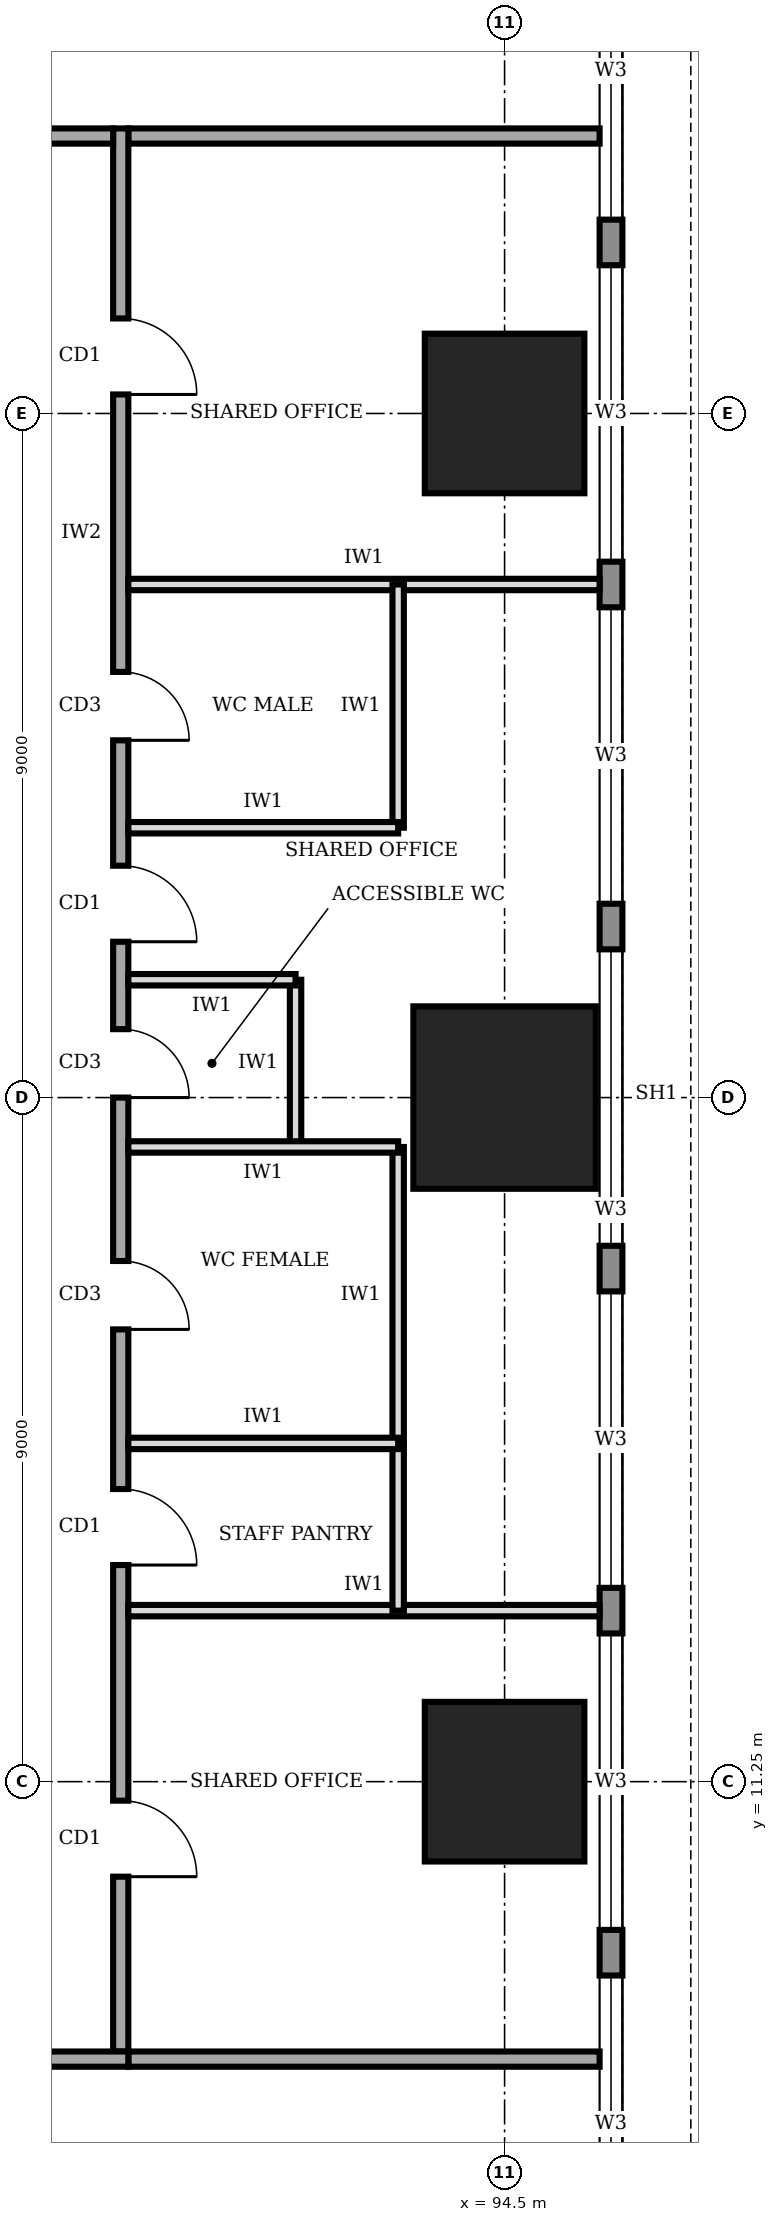
"""IFC4 building model, lengths in metres.
Left out: names, types, materials, properties, quantities, classifications, styles, units other than length and angle.
Written with IfcOpenShell. Run it as: python <this file> out.ifc"""

import sys

from ifc_helpers import new_model, si_unit, direction, frame, frame_2d, origin, origin_2d, place, context, subcontext, project, spatial, rectangle, extrude, element, fill, save


model = new_model("IFC4")
c1 = context("Model", 3, precision=1e-05, world=origin(), true_north=direction((0.0, 1.0)))
c2 = subcontext(c1, "Body", "Model", "MODEL_VIEW")
j1 = project(units=[si_unit("LENGTHUNIT", "METRE"), si_unit("PLANEANGLEUNIT", "RADIAN")], contexts=[c1])
p1 = place(None, origin())
s1 = spatial("IfcSite", under=j1, at=p1, CompositionType="ELEMENT")
p2 = place(p1, origin())
s2 = spatial("IfcBuilding", under=s1, at=p2, CompositionType="ELEMENT")
p3 = place(p2, frame((0.0, 0.0, 89.0)))
s3 = spatial("IfcBuildingStorey", under=s2, at=p3, CompositionType="ELEMENT", Elevation=89.0)
p4 = place(p3, frame((94.5, 11.25, 0.0), z_axis=(0.0, 0.0, 1.0), x_axis=(1.0, 0.0, 0.0)))
e1 = element("IfcColumn", 1, at=p4, inside=s3, PredefinedType="COLUMN", context=c2, shape_type="SweptSolid", body=[
    extrude(rectangle(XDim=2.1, YDim=2.1, at=origin_2d()), origin(), (0.0, 0.0, 1.0), 4.0),
])
p5 = place(p3, frame((94.5, 20.25, 0.0), z_axis=(0.0, 0.0, 1.0), x_axis=(1.0, 0.0, 0.0)))
e2 = element("IfcColumn", 2, at=p5, inside=s3, PredefinedType="COLUMN", context=c2, shape_type="SweptSolid", body=[
    extrude(rectangle(XDim=2.4, YDim=2.4, at=origin_2d()), origin(), (0.0, 0.0, 1.0), 4.0),
])
p6 = place(p3, frame((94.5, 29.25, 0.0), z_axis=(0.0, 0.0, 1.0), x_axis=(1.0, 0.0, 0.0)))
e3 = element("IfcColumn", 3, at=p6, inside=s3, PredefinedType="COLUMN", context=c2, shape_type="SweptSolid", body=[
    extrude(rectangle(XDim=2.1, YDim=2.1, at=origin_2d()), origin(), (0.0, 0.0, 1.0), 4.0),
])
p7 = place(p3, frame((95.9, 3.32, 0.0), z_axis=(0.0, 0.0, 1.0), x_axis=(0.0, 1.0, 0.0)))
e4 = element("IfcWall", 4, at=p7, inside=s3, PredefinedType="STANDARD", context=c2, shape_type="SweptSolid", body=[
    extrude(rectangle(XDim=33.96, YDim=0.3, at=frame_2d((16.98, 0.0))), origin(), (0.0, 0.0, 1.0), 3.75),
])
p8 = place(p7, frame((1.48, 0.0, 0.95)))
e5 = element("IfcOpeningElement", 5, at=p8, cuts=e4, PredefinedType="OPENING", context=c2, shape_type="SweptSolid", body=[
    extrude(rectangle(XDim=3.9, YDim=1.8, at=frame_2d((1.95, 0.9))), frame((0.0, 0.16, 0.0), z_axis=(0.0, -1.0, 0.0), x_axis=(1.0, 0.0, 0.0)), (0.0, 0.0, 1.0), 0.32),
])
p9 = place(p7, frame((5.98, 0.0, 0.95)))
e6 = element("IfcOpeningElement", 6, at=p9, cuts=e4, PredefinedType="OPENING", context=c2, shape_type="SweptSolid", body=[
    extrude(rectangle(XDim=3.9, YDim=1.8, at=frame_2d((1.95, 0.9))), frame((0.0, 0.16, 0.0), z_axis=(0.0, -1.0, 0.0), x_axis=(1.0, 0.0, 0.0)), (0.0, 0.0, 1.0), 0.32),
])
p10 = place(p7, frame((10.48, 0.0, 0.95)))
e7 = element("IfcOpeningElement", 7, at=p10, cuts=e4, PredefinedType="OPENING", context=c2, shape_type="SweptSolid", body=[
    extrude(rectangle(XDim=3.9, YDim=1.8, at=frame_2d((1.95, 0.9))), frame((0.0, 0.16, 0.0), z_axis=(0.0, -1.0, 0.0), x_axis=(1.0, 0.0, 0.0)), (0.0, 0.0, 1.0), 0.32),
])
p11 = place(p7, frame((14.98, 0.0, 0.95)))
e8 = element("IfcOpeningElement", 8, at=p11, cuts=e4, PredefinedType="OPENING", context=c2, shape_type="SweptSolid", body=[
    extrude(rectangle(XDim=3.9, YDim=1.8, at=frame_2d((1.95, 0.9))), frame((0.0, 0.16, 0.0), z_axis=(0.0, -1.0, 0.0), x_axis=(1.0, 0.0, 0.0)), (0.0, 0.0, 1.0), 0.32),
])
p12 = place(p7, frame((19.48, 0.0, 0.95)))
e9 = element("IfcOpeningElement", 9, at=p12, cuts=e4, PredefinedType="OPENING", context=c2, shape_type="SweptSolid", body=[
    extrude(rectangle(XDim=3.9, YDim=1.8, at=frame_2d((1.95, 0.9))), frame((0.0, 0.16, 0.0), z_axis=(0.0, -1.0, 0.0), x_axis=(1.0, 0.0, 0.0)), (0.0, 0.0, 1.0), 0.32),
])
p13 = place(p7, frame((23.98, 0.0, 0.95)))
e10 = element("IfcOpeningElement", 10, at=p13, cuts=e4, PredefinedType="OPENING", context=c2, shape_type="SweptSolid", body=[
    extrude(rectangle(XDim=3.9, YDim=1.8, at=frame_2d((1.95, 0.9))), frame((0.0, 0.16, 0.0), z_axis=(0.0, -1.0, 0.0), x_axis=(1.0, 0.0, 0.0)), (0.0, 0.0, 1.0), 0.32),
])
p14 = place(p7, frame((28.48, 0.0, 0.95)))
e11 = element("IfcOpeningElement", 11, at=p14, cuts=e4, PredefinedType="OPENING", context=c2, shape_type="SweptSolid", body=[
    extrude(rectangle(XDim=3.9, YDim=1.8, at=frame_2d((1.95, 0.9))), frame((0.0, 0.16, 0.0), z_axis=(0.0, -1.0, 0.0), x_axis=(1.0, 0.0, 0.0)), (0.0, 0.0, 1.0), 0.32),
])
p15 = place(p3, frame((63.3, 7.6, 0.0), z_axis=(0.0, 0.0, 1.0), x_axis=(1.0, 0.0, 0.0)))
e12 = element("IfcWall", 12, at=p15, inside=s3, PredefinedType="SOLIDWALL", context=c2, shape_type="SweptSolid", body=[
    extrude(rectangle(XDim=26.25, YDim=0.2, at=frame_2d((13.125, 0.0))), origin(), (0.0, 0.0, 1.0), 3.75),
])
p16 = place(p15, frame((6.0, 0.0, 0.0)))
e13 = element("IfcOpeningElement", 13, at=p16, cuts=e12, PredefinedType="OPENING", context=c2, shape_type="SweptSolid", body=[
    extrude(rectangle(XDim=1.0, YDim=2.1, at=frame_2d((0.5, 1.05))), frame((0.0, 0.11, 0.0), z_axis=(0.0, -1.0, 0.0), x_axis=(1.0, 0.0, 0.0)), (0.0, 0.0, 1.0), 0.22),
])
p17 = place(p15, frame((19.325, 0.0, 0.0)))
e14 = element("IfcOpeningElement", 14, at=p17, cuts=e12, PredefinedType="OPENING", context=c2, shape_type="SweptSolid", body=[
    extrude(rectangle(XDim=1.0, YDim=2.1, at=frame_2d((0.5, 1.05))), frame((0.0, 0.11, 0.0), z_axis=(0.0, -1.0, 0.0), x_axis=(1.0, 0.0, 0.0)), (0.0, 0.0, 1.0), 0.22),
])
p18 = place(p3, frame((89.45, 7.7, 0.0), z_axis=(0.0, 0.0, 1.0), x_axis=(0.0, 1.0, 0.0)))
e15 = element("IfcWall", 15, at=p18, inside=s3, PredefinedType="SOLIDWALL", context=c2, shape_type="SweptSolid", body=[
    extrude(rectangle(XDim=25.3, YDim=0.2, at=frame_2d((12.65, 0.0))), origin(), (0.0, 0.0, 1.0), 3.75),
])
p19 = place(p18, frame((2.3, 0.0, 0.0)))
e16 = element("IfcOpeningElement", 16, at=p19, cuts=e15, PredefinedType="OPENING", context=c2, shape_type="SweptSolid", body=[
    extrude(rectangle(XDim=1.0, YDim=2.1, at=frame_2d((0.5, 1.05))), frame((0.0, 0.11, 0.0), z_axis=(0.0, -1.0, 0.0), x_axis=(1.0, 0.0, 0.0)), (0.0, 0.0, 1.0), 0.22),
])
p20 = place(p18, frame((6.4, 0.0, 0.0)))
e17 = element("IfcOpeningElement", 17, at=p20, cuts=e15, PredefinedType="OPENING", context=c2, shape_type="SweptSolid", body=[
    extrude(rectangle(XDim=1.0, YDim=2.1, at=frame_2d((0.5, 1.05))), frame((0.0, 0.11, 0.0), z_axis=(0.0, -1.0, 0.0), x_axis=(1.0, 0.0, 0.0)), (0.0, 0.0, 1.0), 0.22),
])
p21 = place(p18, frame((9.5, 0.0, 0.0)))
e18 = element("IfcOpeningElement", 18, at=p21, cuts=e15, PredefinedType="OPENING", context=c2, shape_type="SweptSolid", body=[
    extrude(rectangle(XDim=0.9, YDim=2.1, at=frame_2d((0.45, 1.05))), frame((0.0, 0.11, 0.0), z_axis=(0.0, -1.0, 0.0), x_axis=(1.0, 0.0, 0.0)), (0.0, 0.0, 1.0), 0.22),
])
p22 = place(p18, frame((12.55, 0.0, 0.0)))
e19 = element("IfcOpeningElement", 19, at=p22, cuts=e15, PredefinedType="OPENING", context=c2, shape_type="SweptSolid", body=[
    extrude(rectangle(XDim=0.9, YDim=2.1, at=frame_2d((0.45, 1.05))), frame((0.0, 0.11, 0.0), z_axis=(0.0, -1.0, 0.0), x_axis=(1.0, 0.0, 0.0)), (0.0, 0.0, 1.0), 0.22),
])
p23 = place(p18, frame((17.25, 0.0, 0.0)))
e20 = element("IfcOpeningElement", 20, at=p23, cuts=e15, PredefinedType="OPENING", context=c2, shape_type="SweptSolid", body=[
    extrude(rectangle(XDim=0.9, YDim=2.1, at=frame_2d((0.45, 1.05))), frame((0.0, 0.11, 0.0), z_axis=(0.0, -1.0, 0.0), x_axis=(1.0, 0.0, 0.0)), (0.0, 0.0, 1.0), 0.22),
])
p24 = place(p18, frame((14.6, 0.0, 0.0)))
e21 = element("IfcOpeningElement", 21, at=p24, cuts=e15, PredefinedType="OPENING", context=c2, shape_type="SweptSolid", body=[
    extrude(rectangle(XDim=1.0, YDim=2.1, at=frame_2d((0.5, 1.05))), frame((0.0, 0.11, 0.0), z_axis=(0.0, -1.0, 0.0), x_axis=(1.0, 0.0, 0.0)), (0.0, 0.0, 1.0), 0.22),
])
p25 = place(p18, frame((21.8, 0.0, 0.0)))
e22 = element("IfcOpeningElement", 22, at=p25, cuts=e15, PredefinedType="OPENING", context=c2, shape_type="SweptSolid", body=[
    extrude(rectangle(XDim=1.0, YDim=2.1, at=frame_2d((0.5, 1.05))), frame((0.0, 0.11, 0.0), z_axis=(0.0, -1.0, 0.0), x_axis=(1.0, 0.0, 0.0)), (0.0, 0.0, 1.0), 0.22),
])
p26 = place(p3, frame((89.35, 32.9, 0.0), z_axis=(0.0, 0.0, 1.0), x_axis=(-1.0, 0.0, 0.0)))
e23 = element("IfcWall", 23, at=p26, inside=s3, PredefinedType="SOLIDWALL", context=c2, shape_type="SweptSolid", body=[
    extrude(rectangle(XDim=26.05, YDim=0.2, at=frame_2d((13.025, 0.0))), origin(), (0.0, 0.0, 1.0), 3.75),
])
p27 = place(p26, frame((19.05, 0.0, 0.0)))
e24 = element("IfcOpeningElement", 24, at=p27, cuts=e23, PredefinedType="OPENING", context=c2, shape_type="SweptSolid", body=[
    extrude(rectangle(XDim=1.0, YDim=2.1, at=frame_2d((0.5, 1.05))), frame((0.0, 0.11, 0.0), z_axis=(0.0, -1.0, 0.0), x_axis=(1.0, 0.0, 0.0)), (0.0, 0.0, 1.0), 0.22),
])
p28 = place(p26, frame((7.85, 0.0, 0.0)))
e25 = element("IfcOpeningElement", 25, at=p28, cuts=e23, PredefinedType="OPENING", context=c2, shape_type="SweptSolid", body=[
    extrude(rectangle(XDim=1.0, YDim=2.1, at=frame_2d((0.5, 1.05))), frame((0.0, 0.11, 0.0), z_axis=(0.0, -1.0, 0.0), x_axis=(1.0, 0.0, 0.0)), (0.0, 0.0, 1.0), 0.22),
])
p29 = place(p26, frame((1.325, 0.0, 0.0)))
e26 = element("IfcOpeningElement", 26, at=p29, cuts=e23, PredefinedType="OPENING", context=c2, shape_type="SweptSolid", body=[
    extrude(rectangle(XDim=1.0, YDim=2.1, at=frame_2d((0.5, 1.05))), frame((0.0, 0.11, 0.0), z_axis=(0.0, -1.0, 0.0), x_axis=(1.0, 0.0, 0.0)), (0.0, 0.0, 1.0), 0.22),
])
for number, where, z_axis, x_axis in (
    (27, (89.55, 7.6, 0.0), (0.0, 0.0, 1.0), (1.0, 0.0, 0.0)),
    (28, (89.55, 32.9, 0.0), (0.0, 0.0, 1.0), (1.0, 0.0, 0.0)),
):
    element("IfcWall", number, at=place(p3, frame(where, z_axis=z_axis, x_axis=x_axis)), inside=s3, PredefinedType="SOLIDWALL", context=c2, shape_type="SweptSolid", body=[
        extrude(rectangle(XDim=6.2, YDim=0.2, at=frame_2d((3.1, 0.0))), origin(), (0.0, 0.0, 1.0), 3.75),
    ])
for number, where, z_axis, x_axis in (
    (29, (89.55, 13.5, 0.0), (0.0, 0.0, 1.0), (1.0, 0.0, 0.0)),
    (30, (89.55, 27.0, 0.0), (0.0, 0.0, 1.0), (1.0, 0.0, 0.0)),
):
    element("IfcWall", number, at=place(p3, frame(where, z_axis=z_axis, x_axis=x_axis)), inside=s3, PredefinedType="PARTITIONING", context=c2, shape_type="SweptSolid", body=[
        extrude(rectangle(XDim=6.2, YDim=0.15, at=frame_2d((3.1, 0.0))), origin(), (0.0, 0.0, 1.0), 3.75),
    ])
p30 = place(p3, frame((89.55, 15.7, 0.0), z_axis=(0.0, 0.0, 1.0), x_axis=(1.0, 0.0, 0.0)))
e31 = element("IfcWall", 31, at=p30, inside=s3, PredefinedType="PARTITIONING", context=c2, shape_type="SweptSolid", body=[
    extrude(rectangle(XDim=3.55, YDim=0.15, at=frame_2d((1.775, 0.0))), origin(), (0.0, 0.0, 1.0), 3.75),
])
p31 = place(p3, frame((89.55, 19.6, 0.0), z_axis=(0.0, 0.0, 1.0), x_axis=(1.0, 0.0, 0.0)))
e32 = element("IfcWall", 32, at=p31, inside=s3, PredefinedType="PARTITIONING", context=c2, shape_type="SweptSolid", body=[
    extrude(rectangle(XDim=3.55, YDim=0.15, at=frame_2d((1.775, 0.0))), origin(), (0.0, 0.0, 1.0), 2.85),
])
p32 = place(p3, frame((89.55, 21.8, 0.0), z_axis=(0.0, 0.0, 1.0), x_axis=(1.0, 0.0, 0.0)))
e33 = element("IfcWall", 33, at=p32, inside=s3, PredefinedType="PARTITIONING", context=c2, shape_type="SweptSolid", body=[
    extrude(rectangle(XDim=2.2, YDim=0.15, at=frame_2d((1.1, 0.0))), origin(), (0.0, 0.0, 1.0), 3.75),
])
p33 = place(p3, frame((89.55, 23.8, 0.0), z_axis=(0.0, 0.0, 1.0), x_axis=(1.0, 0.0, 0.0)))
e34 = element("IfcWall", 34, at=p33, inside=s3, PredefinedType="PARTITIONING", context=c2, shape_type="SweptSolid", body=[
    extrude(rectangle(XDim=3.55, YDim=0.15, at=frame_2d((1.775, 0.0))), origin(), (0.0, 0.0, 1.0), 3.75),
])
p34 = place(p3, frame((93.1, 13.5, 0.0), z_axis=(0.0, 0.0, 1.0), x_axis=(0.0, 1.0, 0.0)))
e35 = element("IfcWall", 35, at=p34, inside=s3, PredefinedType="PARTITIONING", context=c2, shape_type="SweptSolid", body=[
    extrude(rectangle(XDim=2.2, YDim=0.15, at=frame_2d((1.1, 0.0))), origin(), (0.0, 0.0, 1.0), 3.75),
])
p35 = place(p3, frame((93.1, 15.7, 0.0), z_axis=(0.0, 0.0, 1.0), x_axis=(0.0, 1.0, 0.0)))
e36 = element("IfcWall", 36, at=p35, inside=s3, PredefinedType="PARTITIONING", context=c2, shape_type="SweptSolid", body=[
    extrude(rectangle(XDim=3.9, YDim=0.15, at=frame_2d((1.95, 0.0))), origin(), (0.0, 0.0, 1.0), 3.75),
])
p36 = place(p3, frame((91.75, 19.6, 0.0), z_axis=(0.0, 0.0, 1.0), x_axis=(0.0, 1.0, 0.0)))
e37 = element("IfcWall", 37, at=p36, inside=s3, PredefinedType="PARTITIONING", context=c2, shape_type="SweptSolid", body=[
    extrude(rectangle(XDim=2.2, YDim=0.15, at=frame_2d((1.1, 0.0))), origin(), (0.0, 0.0, 1.0), 3.75),
])
p37 = place(p3, frame((93.1, 23.8, 0.0), z_axis=(0.0, 0.0, 1.0), x_axis=(0.0, 1.0, 0.0)))
e38 = element("IfcWall", 38, at=p37, inside=s3, PredefinedType="PARTITIONING", context=c2, shape_type="SweptSolid", body=[
    extrude(rectangle(XDim=3.2, YDim=0.15, at=frame_2d((1.6, 0.0))), origin(), (0.0, 0.0, 1.0), 3.75),
])
p38 = place(p8, origin())
e39 = element("IfcWindow", 39, at=p38, inside=s3, PartitioningType="SINGLE_PANEL", PredefinedType="WINDOW", context=c2, shape_type="SweptSolid", body=[
    extrude(rectangle(XDim=3.9, YDim=1.8, at=frame_2d((1.95, 0.9))), frame((0.0, 0.03, 0.0), z_axis=(0.0, -1.0, 0.0), x_axis=(1.0, 0.0, 0.0)), (0.0, 0.0, 1.0), 0.06),
])
fill(e5, e39)
p39 = place(p9, origin())
e40 = element("IfcWindow", 40, at=p39, inside=s3, PartitioningType="SINGLE_PANEL", PredefinedType="WINDOW", context=c2, shape_type="SweptSolid", body=[
    extrude(rectangle(XDim=3.9, YDim=1.8, at=frame_2d((1.95, 0.9))), frame((0.0, 0.03, 0.0), z_axis=(0.0, -1.0, 0.0), x_axis=(1.0, 0.0, 0.0)), (0.0, 0.0, 1.0), 0.06),
])
fill(e6, e40)
p40 = place(p10, origin())
e41 = element("IfcWindow", 41, at=p40, inside=s3, PartitioningType="SINGLE_PANEL", PredefinedType="WINDOW", context=c2, shape_type="SweptSolid", body=[
    extrude(rectangle(XDim=3.9, YDim=1.8, at=frame_2d((1.95, 0.9))), frame((0.0, 0.03, 0.0), z_axis=(0.0, -1.0, 0.0), x_axis=(1.0, 0.0, 0.0)), (0.0, 0.0, 1.0), 0.06),
])
fill(e7, e41)
p41 = place(p11, origin())
e42 = element("IfcWindow", 42, at=p41, inside=s3, PartitioningType="SINGLE_PANEL", PredefinedType="WINDOW", context=c2, shape_type="SweptSolid", body=[
    extrude(rectangle(XDim=3.9, YDim=1.8, at=frame_2d((1.95, 0.9))), frame((0.0, 0.03, 0.0), z_axis=(0.0, -1.0, 0.0), x_axis=(1.0, 0.0, 0.0)), (0.0, 0.0, 1.0), 0.06),
])
fill(e8, e42)
p42 = place(p12, origin())
e43 = element("IfcWindow", 43, at=p42, inside=s3, PartitioningType="SINGLE_PANEL", PredefinedType="WINDOW", context=c2, shape_type="SweptSolid", body=[
    extrude(rectangle(XDim=3.9, YDim=1.8, at=frame_2d((1.95, 0.9))), frame((0.0, 0.03, 0.0), z_axis=(0.0, -1.0, 0.0), x_axis=(1.0, 0.0, 0.0)), (0.0, 0.0, 1.0), 0.06),
])
fill(e9, e43)
p43 = place(p13, origin())
e44 = element("IfcWindow", 44, at=p43, inside=s3, PartitioningType="SINGLE_PANEL", PredefinedType="WINDOW", context=c2, shape_type="SweptSolid", body=[
    extrude(rectangle(XDim=3.9, YDim=1.8, at=frame_2d((1.95, 0.9))), frame((0.0, 0.03, 0.0), z_axis=(0.0, -1.0, 0.0), x_axis=(1.0, 0.0, 0.0)), (0.0, 0.0, 1.0), 0.06),
])
fill(e10, e44)
p44 = place(p14, origin())
e45 = element("IfcWindow", 45, at=p44, inside=s3, PartitioningType="SINGLE_PANEL", PredefinedType="WINDOW", context=c2, shape_type="SweptSolid", body=[
    extrude(rectangle(XDim=3.9, YDim=1.8, at=frame_2d((1.95, 0.9))), frame((0.0, 0.03, 0.0), z_axis=(0.0, -1.0, 0.0), x_axis=(1.0, 0.0, 0.0)), (0.0, 0.0, 1.0), 0.06),
])
fill(e11, e45)
p45 = place(p19, frame((1.0, 0.0, 0.0), z_axis=(0.0, 0.0, 1.0), x_axis=(-1.0, 0.0, 0.0)))
e46 = element("IfcDoor", 46, at=p45, inside=s3, OperationType="SINGLE_SWING_RIGHT", PredefinedType="DOOR", context=c2, shape_type="SweptSolid", body=[
    extrude(rectangle(XDim=1.0, YDim=2.1, at=frame_2d((0.5, 1.05))), frame((0.0, 0.025, 0.0), z_axis=(0.0, -1.0, 0.0), x_axis=(1.0, 0.0, 0.0)), (0.0, 0.0, 1.0), 0.05),
])
fill(e16, e46)
p46 = place(p20, frame((1.0, 0.0, 0.0), z_axis=(0.0, 0.0, 1.0), x_axis=(-1.0, 0.0, 0.0)))
e47 = element("IfcDoor", 47, at=p46, inside=s3, OperationType="SINGLE_SWING_RIGHT", PredefinedType="DOOR", context=c2, shape_type="SweptSolid", body=[
    extrude(rectangle(XDim=1.0, YDim=2.1, at=frame_2d((0.5, 1.05))), frame((0.0, 0.025, 0.0), z_axis=(0.0, -1.0, 0.0), x_axis=(1.0, 0.0, 0.0)), (0.0, 0.0, 1.0), 0.05),
])
fill(e17, e47)
p47 = place(p21, frame((0.9, 0.0, 0.0), z_axis=(0.0, 0.0, 1.0), x_axis=(-1.0, 0.0, 0.0)))
e48 = element("IfcDoor", 48, at=p47, inside=s3, OperationType="SINGLE_SWING_RIGHT", PredefinedType="DOOR", context=c2, shape_type="SweptSolid", body=[
    extrude(rectangle(XDim=0.9, YDim=2.1, at=frame_2d((0.45, 1.05))), frame((0.0, 0.025, 0.0), z_axis=(0.0, -1.0, 0.0), x_axis=(1.0, 0.0, 0.0)), (0.0, 0.0, 1.0), 0.05),
])
fill(e18, e48)
p48 = place(p22, frame((0.9, 0.0, 0.0), z_axis=(0.0, 0.0, 1.0), x_axis=(-1.0, 0.0, 0.0)))
e49 = element("IfcDoor", 49, at=p48, inside=s3, OperationType="SINGLE_SWING_RIGHT", PredefinedType="DOOR", context=c2, shape_type="SweptSolid", body=[
    extrude(rectangle(XDim=0.9, YDim=2.1, at=frame_2d((0.45, 1.05))), frame((0.0, 0.025, 0.0), z_axis=(0.0, -1.0, 0.0), x_axis=(1.0, 0.0, 0.0)), (0.0, 0.0, 1.0), 0.05),
])
fill(e19, e49)
p49 = place(p23, frame((0.9, 0.0, 0.0), z_axis=(0.0, 0.0, 1.0), x_axis=(-1.0, 0.0, 0.0)))
e50 = element("IfcDoor", 50, at=p49, inside=s3, OperationType="SINGLE_SWING_RIGHT", PredefinedType="DOOR", context=c2, shape_type="SweptSolid", body=[
    extrude(rectangle(XDim=0.9, YDim=2.1, at=frame_2d((0.45, 1.05))), frame((0.0, 0.025, 0.0), z_axis=(0.0, -1.0, 0.0), x_axis=(1.0, 0.0, 0.0)), (0.0, 0.0, 1.0), 0.05),
])
fill(e20, e50)
p50 = place(p24, frame((1.0, 0.0, 0.0), z_axis=(0.0, 0.0, 1.0), x_axis=(-1.0, 0.0, 0.0)))
e51 = element("IfcDoor", 51, at=p50, inside=s3, OperationType="SINGLE_SWING_RIGHT", PredefinedType="DOOR", context=c2, shape_type="SweptSolid", body=[
    extrude(rectangle(XDim=1.0, YDim=2.1, at=frame_2d((0.5, 1.05))), frame((0.0, 0.025, 0.0), z_axis=(0.0, -1.0, 0.0), x_axis=(1.0, 0.0, 0.0)), (0.0, 0.0, 1.0), 0.05),
])
fill(e21, e51)
p51 = place(p25, frame((1.0, 0.0, 0.0), z_axis=(0.0, 0.0, 1.0), x_axis=(-1.0, 0.0, 0.0)))
e52 = element("IfcDoor", 52, at=p51, inside=s3, OperationType="SINGLE_SWING_RIGHT", PredefinedType="DOOR", context=c2, shape_type="SweptSolid", body=[
    extrude(rectangle(XDim=1.0, YDim=2.1, at=frame_2d((0.5, 1.05))), frame((0.0, 0.025, 0.0), z_axis=(0.0, -1.0, 0.0), x_axis=(1.0, 0.0, 0.0)), (0.0, 0.0, 1.0), 0.05),
])
fill(e22, e52)
save(model, sys.argv[1])
